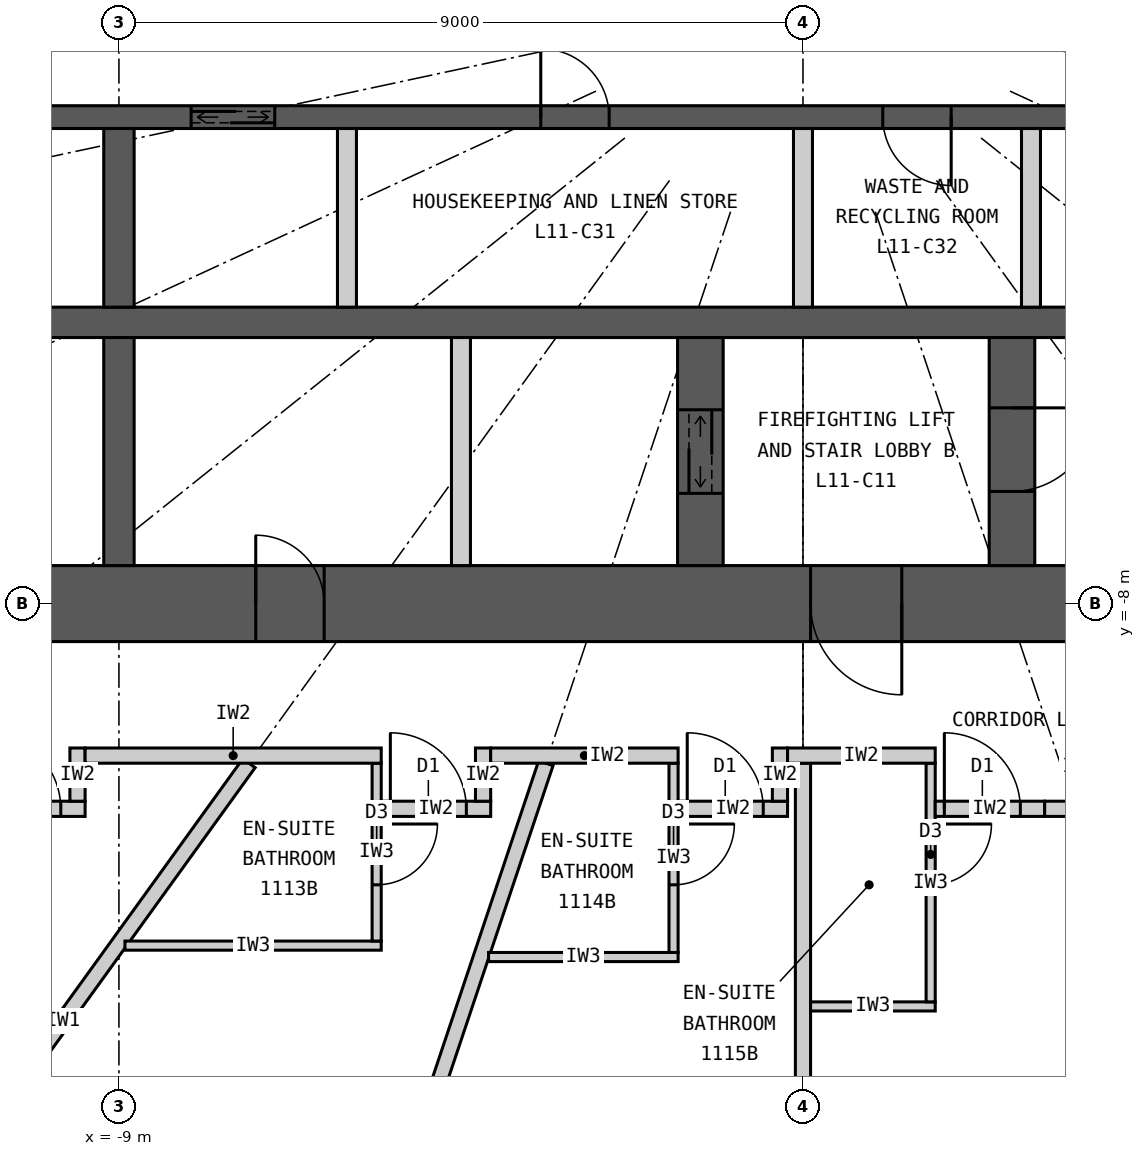
"""IFC4 building model, lengths in metres.
Left out: names, types, materials, properties, quantities, classifications, styles, units other than length and angle.
Written with IfcOpenShell. Run it as: python <this file> out.ifc"""

import sys

from ifc_helpers import new_model, si_unit, direction, frame, frame_2d, origin, place, context, subcontext, project, spatial, rectangle, extrude, element, fill, save


model = new_model("IFC4")
c1 = context("Model", 3, precision=1e-05, world=origin(), true_north=direction((0.0, 1.0)))
c2 = subcontext(c1, "Body", "Model", "MODEL_VIEW")
j1 = project(units=[si_unit("LENGTHUNIT", "METRE"), si_unit("PLANEANGLEUNIT", "RADIAN")], contexts=[c1])
p1 = place(None, origin())
s1 = spatial("IfcSite", under=j1, at=p1, CompositionType="ELEMENT")
p2 = place(p1, origin())
s2 = spatial("IfcBuilding", under=s1, at=p2, CompositionType="ELEMENT")
p3 = place(p2, frame((0.0, 0.0, 50.7)))
s3 = spatial("IfcBuildingStorey", under=s2, at=p3, CompositionType="ELEMENT", Elevation=50.7)
p4 = place(p3, frame((12.5, -8.0, 0.0), z_axis=(0.0, 0.0, 1.0), x_axis=(-1.0, 0.0, 0.0)))
e1 = element("IfcWall", 1, at=p4, inside=s3, PredefinedType="SHEAR", context=c2, shape_type="SweptSolid", body=[
    extrude(rectangle(XDim=25.0, YDim=1.0, at=frame_2d((12.5, 0.0))), origin(), (0.0, 0.0, 1.0), 3.3),
])
p5 = place(p4, frame((11.2, 0.0, 0.0)))
e2 = element("IfcOpeningElement", 2, at=p5, cuts=e1, PredefinedType="OPENING", context=c2, shape_type="SweptSolid", body=[
    extrude(rectangle(XDim=1.2, YDim=2.2, at=frame_2d((0.6, 1.1))), frame((0.0, 0.51, 0.0), z_axis=(0.0, -1.0, 0.0), x_axis=(1.0, 0.0, 0.0)), (0.0, 0.0, 1.0), 1.02),
])
p6 = place(p4, frame((18.8, 0.0, 0.0)))
e3 = element("IfcOpeningElement", 3, at=p6, cuts=e1, PredefinedType="OPENING", context=c2, shape_type="SweptSolid", body=[
    extrude(rectangle(XDim=0.9, YDim=2.2, at=frame_2d((0.45, 1.1))), frame((0.0, 0.51, 0.0), z_axis=(0.0, -1.0, 0.0), x_axis=(1.0, 0.0, 0.0)), (0.0, 0.0, 1.0), 1.02),
])
p7 = place(p3, frame((-11.5, -4.3, 0.0), z_axis=(0.0, 0.0, 1.0), x_axis=(1.0, 0.0, 0.0)))
e4 = element("IfcWall", 4, at=p7, inside=s3, PredefinedType="SHEAR", context=c2, shape_type="SweptSolid", body=[
    extrude(rectangle(XDim=23.0, YDim=0.4, at=frame_2d((11.5, 0.0))), origin(), (0.0, 0.0, 1.0), 3.3),
])
p8 = place(p3, frame((-11.5, -1.6, 0.0), z_axis=(0.0, 0.0, 1.0), x_axis=(1.0, 0.0, 0.0)))
e5 = element("IfcWall", 5, at=p8, inside=s3, PredefinedType="SHEAR", context=c2, shape_type="SweptSolid", body=[
    extrude(rectangle(XDim=23.0, YDim=0.3, at=frame_2d((11.5, 0.0))), origin(), (0.0, 0.0, 1.0), 3.3),
])
p9 = place(p8, frame((0.45, 0.0, 0.0)))
e6 = element("IfcOpeningElement", 6, at=p9, cuts=e5, PredefinedType="OPENING", context=c2, shape_type="SweptSolid", body=[
    extrude(rectangle(XDim=1.1, YDim=2.2, at=frame_2d((0.55, 1.1))), frame((0.0, 0.16, 0.0), z_axis=(0.0, -1.0, 0.0), x_axis=(1.0, 0.0, 0.0)), (0.0, 0.0, 1.0), 0.32),
])
p10 = place(p8, frame((3.45, 0.0, 0.0)))
e7 = element("IfcOpeningElement", 7, at=p10, cuts=e5, PredefinedType="OPENING", context=c2, shape_type="SweptSolid", body=[
    extrude(rectangle(XDim=1.1, YDim=2.2, at=frame_2d((0.55, 1.1))), frame((0.0, 0.16, 0.0), z_axis=(0.0, -1.0, 0.0), x_axis=(1.0, 0.0, 0.0)), (0.0, 0.0, 1.0), 0.32),
])
p11 = place(p8, frame((15.2, 0.0, 0.0)))
e8 = element("IfcOpeningElement", 8, at=p11, cuts=e5, PredefinedType="OPENING", context=c2, shape_type="SweptSolid", body=[
    extrude(rectangle(XDim=1.6, YDim=2.4, at=frame_2d((0.8, 1.2))), frame((0.0, 0.16, 0.0), z_axis=(0.0, -1.0, 0.0), x_axis=(1.0, 0.0, 0.0)), (0.0, 0.0, 1.0), 0.32),
])
p12 = place(p8, frame((8.05, 0.0, 0.0)))
e9 = element("IfcOpeningElement", 9, at=p12, cuts=e5, PredefinedType="OPENING", context=c2, shape_type="SweptSolid", body=[
    extrude(rectangle(XDim=0.9, YDim=2.2, at=frame_2d((0.45, 1.1))), frame((0.0, 0.16, 0.0), z_axis=(0.0, -1.0, 0.0), x_axis=(1.0, 0.0, 0.0)), (0.0, 0.0, 1.0), 0.32),
])
p13 = place(p8, frame((12.55, 0.0, 0.0)))
e10 = element("IfcOpeningElement", 10, at=p13, cuts=e5, PredefinedType="OPENING", context=c2, shape_type="SweptSolid", body=[
    extrude(rectangle(XDim=0.9, YDim=2.2, at=frame_2d((0.45, 1.1))), frame((0.0, 0.16, 0.0), z_axis=(0.0, -1.0, 0.0), x_axis=(1.0, 0.0, 0.0)), (0.0, 0.0, 1.0), 0.32),
])
p14 = place(p3, frame((-9.0, -4.1, 0.0), z_axis=(0.0, 0.0, 1.0), x_axis=(0.0, 1.0, 0.0)))
e11 = element("IfcWall", 11, at=p14, inside=s3, PredefinedType="SHEAR", context=c2, shape_type="SweptSolid", body=[
    extrude(rectangle(XDim=2.35, YDim=0.4, at=frame_2d((1.175, 0.0))), origin(), (0.0, 0.0, 1.0), 3.3),
])
p15 = place(p3, frame((-9.0, -7.5, 0.0), z_axis=(0.0, 0.0, 1.0), x_axis=(0.0, 1.0, 0.0)))
e12 = element("IfcWall", 12, at=p15, inside=s3, PredefinedType="SHEAR", context=c2, shape_type="SweptSolid", body=[
    extrude(rectangle(XDim=3.0, YDim=0.4, at=frame_2d((1.5, 0.0))), origin(), (0.0, 0.0, 1.0), 3.3),
])
p16 = place(p3, frame((2.75, -7.5, 0.0), z_axis=(0.0, 0.0, 1.0), x_axis=(0.0, 1.0, 0.0)))
e13 = element("IfcWall", 13, at=p16, inside=s3, PredefinedType="SHEAR", context=c2, shape_type="SweptSolid", body=[
    extrude(rectangle(XDim=3.0, YDim=0.6, at=frame_2d((1.5, 0.0))), origin(), (0.0, 0.0, 1.0), 3.3),
])
p17 = place(p16, frame((0.975, 0.0, 0.0)))
e14 = element("IfcOpeningElement", 14, at=p17, cuts=e13, PredefinedType="OPENING", context=c2, shape_type="SweptSolid", body=[
    extrude(rectangle(XDim=1.1, YDim=2.2, at=frame_2d((0.55, 1.1))), frame((0.0, 0.31, 0.0), z_axis=(0.0, -1.0, 0.0), x_axis=(1.0, 0.0, 0.0)), (0.0, 0.0, 1.0), 0.62),
])
p18 = place(p3, frame((-1.35, -7.5, 0.0), z_axis=(0.0, 0.0, 1.0), x_axis=(0.0, 1.0, 0.0)))
e15 = element("IfcWall", 15, at=p18, inside=s3, PredefinedType="SHEAR", context=c2, shape_type="SweptSolid", body=[
    extrude(rectangle(XDim=3.0, YDim=0.6, at=frame_2d((1.5, 0.0))), origin(), (0.0, 0.0, 1.0), 3.3),
])
p19 = place(p18, frame((0.95, 0.0, 0.0)))
e16 = element("IfcOpeningElement", 16, at=p19, cuts=e15, PredefinedType="OPENING", context=c2, shape_type="SweptSolid", body=[
    extrude(rectangle(XDim=1.1, YDim=2.2, at=frame_2d((0.55, 1.1))), frame((0.0, 0.31, 0.0), z_axis=(0.0, -1.0, 0.0), x_axis=(1.0, 0.0, 0.0)), (0.0, 0.0, 1.0), 0.62),
])
p20 = place(p3, frame((-4.5, -7.5, 0.0), z_axis=(0.0, 0.0, 1.0), x_axis=(0.0, 1.0, 0.0)))
e17 = element("IfcWall", 17, at=p20, inside=s3, PredefinedType="PARTITIONING", context=c2, shape_type="SweptSolid", body=[
    extrude(rectangle(XDim=3.0, YDim=0.25, at=frame_2d((1.5, 0.0))), origin(), (0.0, 0.0, 1.0), 3.3),
])
for number, where, z_axis, x_axis in (
    (18, (-6.0, -4.1, 0.0), (0.0, 0.0, 1.0), (0.0, 1.0, 0.0)),
    (19, (0.0, -4.1, 0.0), (0.0, 0.0, 1.0), (0.0, 1.0, 0.0)),
    (20, (3.0, -4.1, 0.0), (0.0, 0.0, 1.0), (0.0, 1.0, 0.0)),
):
    element("IfcWall", number, at=place(p3, frame(where, z_axis=z_axis, x_axis=x_axis)), inside=s3, PredefinedType="PARTITIONING", context=c2, shape_type="SweptSolid", body=[
        extrude(rectangle(XDim=2.35, YDim=0.25, at=frame_2d((1.175, 0.0))), origin(), (0.0, 0.0, 1.0), 3.3),
    ])
p21 = place(p3, frame((-7.289, -10.1, 0.0), z_axis=(0.0, 0.0, 1.0), x_axis=(-0.585198353053, -0.810890182197, 0.0)))
e21 = element("IfcWall", 21, at=p21, inside=s3, PredefinedType="PARTITIONING", context=c2, shape_type="SweptSolid", body=[
    extrude(rectangle(XDim=8.36, YDim=0.2, at=frame_2d((4.18, 0.0))), origin(), (0.0, 0.0, 1.0), 2.32),
])
p22 = place(p3, frame((-3.383, -10.1, 0.0), z_axis=(0.0, 0.0, 1.0), x_axis=(-0.31759592231, -0.948226149256, 0.0)))
e22 = element("IfcWall", 22, at=p22, inside=s3, PredefinedType="PARTITIONING", context=c2, shape_type="SweptSolid", body=[
    extrude(rectangle(XDim=9.098, YDim=0.2, at=frame_2d((4.549, 0.0))), origin(), (0.0, 0.0, 1.0), 2.32),
])
p23 = place(p3, frame((0.0, -10.1, 0.0), z_axis=(0.0, 0.0, 1.0), x_axis=(0.0, -1.0, 0.0)))
e23 = element("IfcWall", 23, at=p23, inside=s3, PredefinedType="PARTITIONING", context=c2, shape_type="SweptSolid", body=[
    extrude(rectangle(XDim=9.25, YDim=0.2, at=frame_2d((4.625, 0.0))), origin(), (0.0, 0.0, 1.0), 2.32),
])
p24 = place(p3, frame((-8.921, -12.5, 0.0), z_axis=(0.0, 0.0, 1.0), x_axis=(1.0, 0.0, 0.0)))
e24 = element("IfcWall", 24, at=p24, inside=s3, PredefinedType="PARTITIONING", context=c2, shape_type="SweptSolid", body=[
    extrude(rectangle(XDim=3.372, YDim=0.12, at=frame_2d((1.686, 0.0))), origin(), (0.0, 0.0, 1.0), 3.12),
])
p25 = place(p3, frame((-5.609, -10.1, 0.0), z_axis=(0.0, 0.0, 1.0), x_axis=(0.0, -1.0, 0.0)))
e25 = element("IfcWall", 25, at=p25, inside=s3, PredefinedType="PARTITIONING", context=c2, shape_type="SweptSolid", body=[
    extrude(rectangle(XDim=2.34, YDim=0.12, at=frame_2d((1.17, 0.0))), origin(), (0.0, 0.0, 1.0), 3.12),
])
p26 = place(p25, frame((0.8, 0.0, 0.0)))
e26 = element("IfcOpeningElement", 26, at=p26, cuts=e25, PredefinedType="OPENING", context=c2, shape_type="SweptSolid", body=[
    extrude(rectangle(XDim=0.8, YDim=2.1, at=frame_2d((0.4, 1.05))), frame((0.0, 0.07, 0.0), z_axis=(0.0, -1.0, 0.0), x_axis=(1.0, 0.0, 0.0)), (0.0, 0.0, 1.0), 0.14),
])
p27 = place(p3, frame((-4.137, -12.65, 0.0), z_axis=(0.0, 0.0, 1.0), x_axis=(1.0, 0.0, 0.0)))
e27 = element("IfcWall", 27, at=p27, inside=s3, PredefinedType="PARTITIONING", context=c2, shape_type="SweptSolid", body=[
    extrude(rectangle(XDim=2.494, YDim=0.12, at=frame_2d((1.247, 0.0))), origin(), (0.0, 0.0, 1.0), 3.12),
])
p28 = place(p3, frame((-1.703, -10.1, 0.0), z_axis=(0.0, 0.0, 1.0), x_axis=(0.0, -1.0, 0.0)))
e28 = element("IfcWall", 28, at=p28, inside=s3, PredefinedType="PARTITIONING", context=c2, shape_type="SweptSolid", body=[
    extrude(rectangle(XDim=2.49, YDim=0.12, at=frame_2d((1.245, 0.0))), origin(), (0.0, 0.0, 1.0), 3.12),
])
p29 = place(p28, frame((0.8, 0.0, 0.0)))
e29 = element("IfcOpeningElement", 29, at=p29, cuts=e28, PredefinedType="OPENING", context=c2, shape_type="SweptSolid", body=[
    extrude(rectangle(XDim=0.8, YDim=2.1, at=frame_2d((0.4, 1.05))), frame((0.0, 0.07, 0.0), z_axis=(0.0, -1.0, 0.0), x_axis=(1.0, 0.0, 0.0)), (0.0, 0.0, 1.0), 0.14),
])
p30 = place(p3, frame((0.1, -13.3, 0.0), z_axis=(0.0, 0.0, 1.0), x_axis=(1.0, 0.0, 0.0)))
e30 = element("IfcWall", 30, at=p30, inside=s3, PredefinedType="PARTITIONING", context=c2, shape_type="SweptSolid", body=[
    extrude(rectangle(XDim=1.64, YDim=0.12, at=frame_2d((0.82, 0.0))), origin(), (0.0, 0.0, 1.0), 3.12),
])
p31 = place(p3, frame((1.68, -10.1, 0.0), z_axis=(0.0, 0.0, 1.0), x_axis=(0.0, -1.0, 0.0)))
e31 = element("IfcWall", 31, at=p31, inside=s3, PredefinedType="PARTITIONING", context=c2, shape_type="SweptSolid", body=[
    extrude(rectangle(XDim=3.14, YDim=0.12, at=frame_2d((1.57, 0.0))), origin(), (0.0, 0.0, 1.0), 3.12),
])
p32 = place(p31, frame((0.8, 0.0, 0.0)))
e32 = element("IfcOpeningElement", 32, at=p32, cuts=e31, PredefinedType="OPENING", context=c2, shape_type="SweptSolid", body=[
    extrude(rectangle(XDim=0.8, YDim=2.1, at=frame_2d((0.4, 1.05))), frame((0.0, 0.07, 0.0), z_axis=(0.0, -1.0, 0.0), x_axis=(1.0, 0.0, 0.0)), (0.0, 0.0, 1.0), 0.14),
])
p33 = place(p3, frame((-9.445, -10.7, 0.0), z_axis=(0.0, 0.0, 1.0), x_axis=(-1.0, 0.0, 0.0)))
e33 = element("IfcWall", 33, at=p33, inside=s3, PredefinedType="PARTITIONING", context=c2, shape_type="SweptSolid", body=[
    extrude(rectangle(XDim=1.44, YDim=0.2, at=frame_2d((0.72, 0.0))), origin(), (0.0, 0.0, 1.0), 3.12),
])
p34 = place(p33, frame((0.32, 0.0, 0.0)))
e34 = element("IfcOpeningElement", 34, at=p34, cuts=e33, PredefinedType="OPENING", context=c2, shape_type="SweptSolid", body=[
    extrude(rectangle(XDim=1.0, YDim=2.2, at=frame_2d((0.5, 1.1))), frame((0.0, 0.11, 0.0), z_axis=(0.0, -1.0, 0.0), x_axis=(1.0, 0.0, 0.0)), (0.0, 0.0, 1.0), 0.22),
])
p35 = place(p3, frame((-9.545, -9.9, 0.0), z_axis=(0.0, 0.0, 1.0), x_axis=(0.0, -1.0, 0.0)))
e35 = element("IfcWall", 35, at=p35, inside=s3, PredefinedType="PARTITIONING", context=c2, shape_type="SweptSolid", body=[
    extrude(rectangle(XDim=0.7, YDim=0.2, at=frame_2d((0.35, 0.0))), origin(), (0.0, 0.0, 1.0), 3.12),
])
p36 = place(p3, frame((-4.109, -10.7, 0.0), z_axis=(0.0, 0.0, 1.0), x_axis=(-1.0, 0.0, 0.0)))
e36 = element("IfcWall", 36, at=p36, inside=s3, PredefinedType="PARTITIONING", context=c2, shape_type="SweptSolid", body=[
    extrude(rectangle(XDim=1.44, YDim=0.2, at=frame_2d((0.72, 0.0))), origin(), (0.0, 0.0, 1.0), 3.12),
])
p37 = place(p36, frame((0.32, 0.0, 0.0)))
e37 = element("IfcOpeningElement", 37, at=p37, cuts=e36, PredefinedType="OPENING", context=c2, shape_type="SweptSolid", body=[
    extrude(rectangle(XDim=1.0, YDim=2.2, at=frame_2d((0.5, 1.1))), frame((0.0, 0.11, 0.0), z_axis=(0.0, -1.0, 0.0), x_axis=(1.0, 0.0, 0.0)), (0.0, 0.0, 1.0), 0.22),
])
p38 = place(p3, frame((-4.209, -9.9, 0.0), z_axis=(0.0, 0.0, 1.0), x_axis=(0.0, -1.0, 0.0)))
e38 = element("IfcWall", 38, at=p38, inside=s3, PredefinedType="PARTITIONING", context=c2, shape_type="SweptSolid", body=[
    extrude(rectangle(XDim=0.7, YDim=0.2, at=frame_2d((0.35, 0.0))), origin(), (0.0, 0.0, 1.0), 3.12),
])
p39 = place(p3, frame((-0.203, -10.7, 0.0), z_axis=(0.0, 0.0, 1.0), x_axis=(-1.0, 0.0, 0.0)))
e39 = element("IfcWall", 39, at=p39, inside=s3, PredefinedType="PARTITIONING", context=c2, shape_type="SweptSolid", body=[
    extrude(rectangle(XDim=1.44, YDim=0.2, at=frame_2d((0.72, 0.0))), origin(), (0.0, 0.0, 1.0), 3.12),
])
p40 = place(p39, frame((0.32, 0.0, 0.0)))
e40 = element("IfcOpeningElement", 40, at=p40, cuts=e39, PredefinedType="OPENING", context=c2, shape_type="SweptSolid", body=[
    extrude(rectangle(XDim=1.0, YDim=2.2, at=frame_2d((0.5, 1.1))), frame((0.0, 0.11, 0.0), z_axis=(0.0, -1.0, 0.0), x_axis=(1.0, 0.0, 0.0)), (0.0, 0.0, 1.0), 0.22),
])
p41 = place(p3, frame((-0.303, -9.9, 0.0), z_axis=(0.0, 0.0, 1.0), x_axis=(0.0, -1.0, 0.0)))
e41 = element("IfcWall", 41, at=p41, inside=s3, PredefinedType="PARTITIONING", context=c2, shape_type="SweptSolid", body=[
    extrude(rectangle(XDim=0.7, YDim=0.2, at=frame_2d((0.35, 0.0))), origin(), (0.0, 0.0, 1.0), 3.12),
])
p42 = place(p3, frame((3.18, -10.7, 0.0), z_axis=(0.0, 0.0, 1.0), x_axis=(-1.0, 0.0, 0.0)))
e42 = element("IfcWall", 42, at=p42, inside=s3, PredefinedType="PARTITIONING", context=c2, shape_type="SweptSolid", body=[
    extrude(rectangle(XDim=1.44, YDim=0.2, at=frame_2d((0.72, 0.0))), origin(), (0.0, 0.0, 1.0), 3.12),
])
p43 = place(p42, frame((0.32, 0.0, 0.0)))
e43 = element("IfcOpeningElement", 43, at=p43, cuts=e42, PredefinedType="OPENING", context=c2, shape_type="SweptSolid", body=[
    extrude(rectangle(XDim=1.0, YDim=2.2, at=frame_2d((0.5, 1.1))), frame((0.0, 0.11, 0.0), z_axis=(0.0, -1.0, 0.0), x_axis=(1.0, 0.0, 0.0)), (0.0, 0.0, 1.0), 0.22),
])
p44 = place(p3, frame((4.109, -10.7, 0.0), z_axis=(0.0, 0.0, 1.0), x_axis=(-1.0, 0.0, 0.0)))
e44 = element("IfcWall", 44, at=p44, inside=s3, PredefinedType="PARTITIONING", context=c2, shape_type="SweptSolid", body=[
    extrude(rectangle(XDim=0.929, YDim=0.2, at=frame_2d((0.465, 0.0))), origin(), (0.0, 0.0, 1.0), 3.12),
])
p45 = place(p3, frame((1.74, -10.0, 0.0), z_axis=(0.0, 0.0, 1.0), x_axis=(-1.0, 0.0, 0.0)))
e45 = element("IfcWall", 45, at=p45, inside=s3, PredefinedType="PARTITIONING", context=c2, shape_type="SweptSolid", body=[
    extrude(rectangle(XDim=1.943, YDim=0.2, at=frame_2d((0.971, 0.0))), origin(), (0.0, 0.0, 1.0), 3.12),
])
p46 = place(p3, frame((-1.643, -10.0, 0.0), z_axis=(0.0, 0.0, 1.0), x_axis=(-1.0, 0.0, 0.0)))
e46 = element("IfcWall", 46, at=p46, inside=s3, PredefinedType="PARTITIONING", context=c2, shape_type="SweptSolid", body=[
    extrude(rectangle(XDim=2.466, YDim=0.2, at=frame_2d((1.233, 0.0))), origin(), (0.0, 0.0, 1.0), 3.12),
])
p47 = place(p3, frame((-5.549, -10.0, 0.0), z_axis=(0.0, 0.0, 1.0), x_axis=(-1.0, 0.0, 0.0)))
e47 = element("IfcWall", 47, at=p47, inside=s3, PredefinedType="PARTITIONING", context=c2, shape_type="SweptSolid", body=[
    extrude(rectangle(XDim=3.896, YDim=0.2, at=frame_2d((1.948, 0.0))), origin(), (0.0, 0.0, 1.0), 3.12),
])
p48 = place(p34, origin())
e48 = element("IfcDoor", 48, at=p48, inside=s3, OperationType="SINGLE_SWING_RIGHT", PredefinedType="DOOR", context=c2, shape_type="SweptSolid", body=[
    extrude(rectangle(XDim=1.0, YDim=2.2, at=frame_2d((0.5, 1.1))), frame((0.0, 0.025, 0.0), z_axis=(0.0, -1.0, 0.0), x_axis=(1.0, 0.0, 0.0)), (0.0, 0.0, 1.0), 0.05),
])
fill(e34, e48)
p49 = place(p26, origin())
e49 = element("IfcDoor", 49, at=p49, inside=s3, OperationType="SINGLE_SWING_LEFT", PredefinedType="DOOR", context=c2, shape_type="SweptSolid", body=[
    extrude(rectangle(XDim=0.8, YDim=2.1, at=frame_2d((0.4, 1.05))), frame((0.0, 0.025, 0.0), z_axis=(0.0, -1.0, 0.0), x_axis=(1.0, 0.0, 0.0)), (0.0, 0.0, 1.0), 0.05),
])
fill(e26, e49)
p50 = place(p37, origin())
e50 = element("IfcDoor", 50, at=p50, inside=s3, OperationType="SINGLE_SWING_RIGHT", PredefinedType="DOOR", context=c2, shape_type="SweptSolid", body=[
    extrude(rectangle(XDim=1.0, YDim=2.2, at=frame_2d((0.5, 1.1))), frame((0.0, 0.025, 0.0), z_axis=(0.0, -1.0, 0.0), x_axis=(1.0, 0.0, 0.0)), (0.0, 0.0, 1.0), 0.05),
])
fill(e37, e50)
p51 = place(p29, origin())
e51 = element("IfcDoor", 51, at=p51, inside=s3, OperationType="SINGLE_SWING_LEFT", PredefinedType="DOOR", context=c2, shape_type="SweptSolid", body=[
    extrude(rectangle(XDim=0.8, YDim=2.1, at=frame_2d((0.4, 1.05))), frame((0.0, 0.025, 0.0), z_axis=(0.0, -1.0, 0.0), x_axis=(1.0, 0.0, 0.0)), (0.0, 0.0, 1.0), 0.05),
])
fill(e29, e51)
p52 = place(p40, origin())
e52 = element("IfcDoor", 52, at=p52, inside=s3, OperationType="SINGLE_SWING_RIGHT", PredefinedType="DOOR", context=c2, shape_type="SweptSolid", body=[
    extrude(rectangle(XDim=1.0, YDim=2.2, at=frame_2d((0.5, 1.1))), frame((0.0, 0.025, 0.0), z_axis=(0.0, -1.0, 0.0), x_axis=(1.0, 0.0, 0.0)), (0.0, 0.0, 1.0), 0.05),
])
fill(e40, e52)
p53 = place(p32, origin())
e53 = element("IfcDoor", 53, at=p53, inside=s3, OperationType="SINGLE_SWING_LEFT", PredefinedType="DOOR", context=c2, shape_type="SweptSolid", body=[
    extrude(rectangle(XDim=0.8, YDim=2.1, at=frame_2d((0.4, 1.05))), frame((0.0, 0.025, 0.0), z_axis=(0.0, -1.0, 0.0), x_axis=(1.0, 0.0, 0.0)), (0.0, 0.0, 1.0), 0.05),
])
fill(e32, e53)
p54 = place(p43, origin())
e54 = element("IfcDoor", 54, at=p54, inside=s3, OperationType="SINGLE_SWING_RIGHT", PredefinedType="DOOR", context=c2, shape_type="SweptSolid", body=[
    extrude(rectangle(XDim=1.0, YDim=2.2, at=frame_2d((0.5, 1.1))), frame((0.0, 0.025, 0.0), z_axis=(0.0, -1.0, 0.0), x_axis=(1.0, 0.0, 0.0)), (0.0, 0.0, 1.0), 0.05),
])
fill(e43, e54)
p55 = place(p5, origin())
e55 = element("IfcDoor", 55, at=p55, inside=s3, OperationType="SINGLE_SWING_LEFT", PredefinedType="DOOR", context=c2, shape_type="SweptSolid", body=[
    extrude(rectangle(XDim=1.2, YDim=2.2, at=frame_2d((0.6, 1.1))), frame((0.0, 0.025, 0.0), z_axis=(0.0, -1.0, 0.0), x_axis=(1.0, 0.0, 0.0)), (0.0, 0.0, 1.0), 0.05),
])
fill(e2, e55)
p56 = place(p17, origin())
e56 = element("IfcDoor", 56, at=p56, inside=s3, OperationType="SINGLE_SWING_RIGHT", PredefinedType="DOOR", context=c2, shape_type="SweptSolid", body=[
    extrude(rectangle(XDim=1.1, YDim=2.2, at=frame_2d((0.55, 1.1))), frame((0.0, 0.025, 0.0), z_axis=(0.0, -1.0, 0.0), x_axis=(1.0, 0.0, 0.0)), (0.0, 0.0, 1.0), 0.05),
])
fill(e14, e56)
p57 = place(p19, origin())
e57 = element("IfcDoor", 57, at=p57, inside=s3, OperationType="DOUBLE_DOOR_SLIDING", PredefinedType="DOOR", context=c2, shape_type="SweptSolid", body=[
    extrude(rectangle(XDim=1.1, YDim=2.2, at=frame_2d((0.55, 1.1))), frame((0.0, 0.025, 0.0), z_axis=(0.0, -1.0, 0.0), x_axis=(1.0, 0.0, 0.0)), (0.0, 0.0, 1.0), 0.05),
])
fill(e16, e57)
p58 = place(p6, origin())
e58 = element("IfcDoor", 58, at=p58, inside=s3, OperationType="SINGLE_SWING_RIGHT", PredefinedType="DOOR", context=c2, shape_type="SweptSolid", body=[
    extrude(rectangle(XDim=0.9, YDim=2.2, at=frame_2d((0.45, 1.1))), frame((0.0, 0.025, 0.0), z_axis=(0.0, -1.0, 0.0), x_axis=(1.0, 0.0, 0.0)), (0.0, 0.0, 1.0), 0.05),
])
fill(e3, e58)
p59 = place(p10, origin())
e59 = element("IfcDoor", 59, at=p59, inside=s3, OperationType="DOUBLE_DOOR_SLIDING", PredefinedType="DOOR", context=c2, shape_type="SweptSolid", body=[
    extrude(rectangle(XDim=1.1, YDim=2.2, at=frame_2d((0.55, 1.1))), frame((0.0, 0.025, 0.0), z_axis=(0.0, -1.0, 0.0), x_axis=(1.0, 0.0, 0.0)), (0.0, 0.0, 1.0), 0.05),
])
fill(e7, e59)
p60 = place(p12, origin())
e60 = element("IfcDoor", 60, at=p60, inside=s3, OperationType="SINGLE_SWING_LEFT", PredefinedType="DOOR", context=c2, shape_type="SweptSolid", body=[
    extrude(rectangle(XDim=0.9, YDim=2.2, at=frame_2d((0.45, 1.1))), frame((0.0, 0.025, 0.0), z_axis=(0.0, -1.0, 0.0), x_axis=(1.0, 0.0, 0.0)), (0.0, 0.0, 1.0), 0.05),
])
fill(e9, e60)
p61 = place(p13, origin())
e61 = element("IfcDoor", 61, at=p61, inside=s3, OperationType="SINGLE_SWING_RIGHT", PredefinedType="DOOR", context=c2, shape_type="SweptSolid", body=[
    extrude(rectangle(XDim=0.9, YDim=2.2, at=frame_2d((0.45, 1.1))), frame((0.0, 0.025, 0.0), z_axis=(0.0, -1.0, 0.0), x_axis=(1.0, 0.0, 0.0)), (0.0, 0.0, 1.0), 0.05),
])
fill(e10, e61)
save(model, sys.argv[1])
